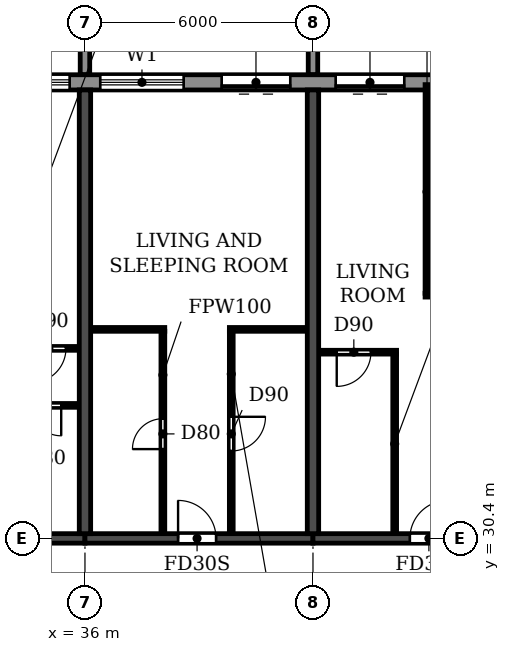
"""IFC4 building model, lengths in metres.
Left out: names, types, materials, properties, quantities, classifications, styles, units other than length and angle.
Written with IfcOpenShell. Run it as: python <this file> out.ifc"""

import sys

from ifc_helpers import new_model, si_unit, direction, frame, frame_2d, origin, place, context, subcontext, project, spatial, polyline, rectangle, outline, extrude, source, transform, mapped, element, fill, save


model = new_model("IFC4")
c1 = context("Model", 3, precision=1e-05, world=origin(), true_north=direction((0.0, 1.0)))
c2 = subcontext(c1, "Body", "Model", "MODEL_VIEW")
j1 = project(units=[si_unit("LENGTHUNIT", "METRE"), si_unit("PLANEANGLEUNIT", "RADIAN")], contexts=[c1])
p1 = place(None, origin())
s1 = spatial("IfcSite", under=j1, at=p1, CompositionType="ELEMENT")
p2 = place(p1, origin())
s2 = spatial("IfcBuilding", under=s1, at=p2, CompositionType="ELEMENT")
p3 = place(p2, frame((0.0, 0.0, 132.3)))
s3 = spatial("IfcBuildingStorey", under=s2, at=p3, CompositionType="ELEMENT", Elevation=132.3)
for number, where, z_axis, x_axis in (
    (1, (36.0, 30.525, 0.0), (0.0, 0.0, 1.0), (0.0, 1.0, 0.0)),
    (2, (42.0, 30.525, 0.0), (0.0, 0.0, 1.0), (0.0, 1.0, 0.0)),
):
    element("IfcWall", number, at=place(p3, frame(where, z_axis=z_axis, x_axis=x_axis)), inside=s3, PredefinedType="SHEAR", context=c2, shape_type="SweptSolid", body=[
        extrude(rectangle(XDim=11.675, YDim=0.3, at=frame_2d((5.837, 0.0))), origin(), (0.0, 0.0, 1.0), 3.07),
    ])
p4 = place(p3, frame((30.0, 30.4, 0.0), z_axis=(0.0, 0.0, 1.0), x_axis=(1.0, 0.0, 0.0)))
e3 = element("IfcWall", 3, at=p4, inside=s3, PredefinedType="SHEAR", context=c2, shape_type="SweptSolid", body=[
    extrude(rectangle(XDim=6.0, YDim=0.25, at=frame_2d((3.0, 0.0))), origin(), (0.0, 0.0, 1.0), 2.47),
])
p5 = place(p4, frame((2.55, 0.0, 0.0)))
e4 = element("IfcOpeningElement", 4, at=p5, cuts=e3, PredefinedType="OPENING", context=c2, shape_type="SweptSolid", body=[
    extrude(rectangle(XDim=1.0, YDim=2.1, at=frame_2d((0.5, 1.05))), frame((0.0, 0.135, 0.0), z_axis=(0.0, -1.0, 0.0), x_axis=(1.0, 0.0, 0.0)), (0.0, 0.0, 1.0), 0.27),
])
p6 = place(p3, frame((36.0, 30.4, 0.0), z_axis=(0.0, 0.0, 1.0), x_axis=(1.0, 0.0, 0.0)))
e5 = element("IfcWall", 5, at=p6, inside=s3, PredefinedType="SHEAR", context=c2, shape_type="SweptSolid", body=[
    extrude(rectangle(XDim=6.0, YDim=0.25, at=frame_2d((3.0, 0.0))), origin(), (0.0, 0.0, 1.0), 2.47),
])
p7 = place(p6, frame((2.45, 0.0, 0.0)))
e6 = element("IfcOpeningElement", 6, at=p7, cuts=e5, PredefinedType="OPENING", context=c2, shape_type="SweptSolid", body=[
    extrude(rectangle(XDim=1.0, YDim=2.1, at=frame_2d((0.5, 1.05))), frame((0.0, 0.135, 0.0), z_axis=(0.0, -1.0, 0.0), x_axis=(1.0, 0.0, 0.0)), (0.0, 0.0, 1.0), 0.27),
])
p8 = place(p3, frame((42.0, 30.4, 0.0), z_axis=(0.0, 0.0, 1.0), x_axis=(1.0, 0.0, 0.0)))
e7 = element("IfcWall", 7, at=p8, inside=s3, PredefinedType="SHEAR", context=c2, shape_type="SweptSolid", body=[
    extrude(rectangle(XDim=6.0, YDim=0.25, at=frame_2d((3.0, 0.0))), origin(), (0.0, 0.0, 1.0), 2.47),
])
p9 = place(p8, frame((2.55, 0.0, 0.0)))
e8 = element("IfcOpeningElement", 8, at=p9, cuts=e7, PredefinedType="OPENING", context=c2, shape_type="SweptSolid", body=[
    extrude(rectangle(XDim=1.0, YDim=2.1, at=frame_2d((0.5, 1.05))), frame((0.0, 0.135, 0.0), z_axis=(0.0, -1.0, 0.0), x_axis=(1.0, 0.0, 0.0)), (0.0, 0.0, 1.0), 0.27),
])
p10 = place(p3, frame((85.317, 42.4, 0.0), z_axis=(0.0, 0.0, 1.0), x_axis=(-1.0, 0.0, 0.0)))
e9 = element("IfcWall", 9, at=p10, inside=s3, PredefinedType="STANDARD", context=c2, shape_type="SweptSolid", body=[
    extrude(rectangle(XDim=68.634, YDim=0.4, at=frame_2d((34.317, 0.0))), origin(), (0.0, 0.0, 1.0), 3.07),
])
p11 = place(p10, frame((64.917, 0.0, 0.0)))
e10 = element("IfcOpeningElement", 10, at=p11, cuts=e9, PredefinedType="OPENING", context=c2, shape_type="SweptSolid", body=[
    extrude(rectangle(XDim=1.8, YDim=2.4, at=frame_2d((0.9, 1.2))), frame((0.0, 0.21, 0.0), z_axis=(0.0, -1.0, 0.0), x_axis=(1.0, 0.0, 0.0)), (0.0, 0.0, 1.0), 0.42),
])
p12 = place(p10, frame((61.717, 0.0, 0.9)))
e11 = element("IfcOpeningElement", 11, at=p12, cuts=e9, PredefinedType="OPENING", context=c2, shape_type="SweptSolid", body=[
    extrude(rectangle(XDim=2.2, YDim=1.5, at=frame_2d((1.1, 0.75))), frame((0.0, 0.21, 0.0), z_axis=(0.0, -1.0, 0.0), x_axis=(1.0, 0.0, 0.0)), (0.0, 0.0, 1.0), 0.42),
])
p13 = place(p10, frame((58.717, 0.0, 0.9)))
e12 = element("IfcOpeningElement", 12, at=p13, cuts=e9, PredefinedType="OPENING", context=c2, shape_type="SweptSolid", body=[
    extrude(rectangle(XDim=2.2, YDim=1.5, at=frame_2d((1.1, 0.75))), frame((0.0, 0.21, 0.0), z_axis=(0.0, -1.0, 0.0), x_axis=(1.0, 0.0, 0.0)), (0.0, 0.0, 1.0), 0.42),
])
p14 = place(p10, frame((55.717, 0.0, 0.9)))
e13 = element("IfcOpeningElement", 13, at=p14, cuts=e9, PredefinedType="OPENING", context=c2, shape_type="SweptSolid", body=[
    extrude(rectangle(XDim=2.2, YDim=1.5, at=frame_2d((1.1, 0.75))), frame((0.0, 0.21, 0.0), z_axis=(0.0, -1.0, 0.0), x_axis=(1.0, 0.0, 0.0)), (0.0, 0.0, 1.0), 0.42),
])
p15 = place(p10, frame((52.917, 0.0, 0.0)))
e14 = element("IfcOpeningElement", 14, at=p15, cuts=e9, PredefinedType="OPENING", context=c2, shape_type="SweptSolid", body=[
    extrude(rectangle(XDim=1.8, YDim=2.4, at=frame_2d((0.9, 1.2))), frame((0.0, 0.21, 0.0), z_axis=(0.0, -1.0, 0.0), x_axis=(1.0, 0.0, 0.0)), (0.0, 0.0, 1.0), 0.42),
])
p16 = place(p10, frame((49.717, 0.0, 0.9)))
e15 = element("IfcOpeningElement", 15, at=p16, cuts=e9, PredefinedType="OPENING", context=c2, shape_type="SweptSolid", body=[
    extrude(rectangle(XDim=2.2, YDim=1.5, at=frame_2d((1.1, 0.75))), frame((0.0, 0.21, 0.0), z_axis=(0.0, -1.0, 0.0), x_axis=(1.0, 0.0, 0.0)), (0.0, 0.0, 1.0), 0.42),
])
p17 = place(p10, frame((46.717, 0.0, 0.9)))
e16 = element("IfcOpeningElement", 16, at=p17, cuts=e9, PredefinedType="OPENING", context=c2, shape_type="SweptSolid", body=[
    extrude(rectangle(XDim=2.2, YDim=1.5, at=frame_2d((1.1, 0.75))), frame((0.0, 0.21, 0.0), z_axis=(0.0, -1.0, 0.0), x_axis=(1.0, 0.0, 0.0)), (0.0, 0.0, 1.0), 0.42),
])
p18 = place(p10, frame((43.917, 0.0, 0.0)))
e17 = element("IfcOpeningElement", 17, at=p18, cuts=e9, PredefinedType="OPENING", context=c2, shape_type="SweptSolid", body=[
    extrude(rectangle(XDim=1.8, YDim=2.4, at=frame_2d((0.9, 1.2))), frame((0.0, 0.21, 0.0), z_axis=(0.0, -1.0, 0.0), x_axis=(1.0, 0.0, 0.0)), (0.0, 0.0, 1.0), 0.42),
])
p19 = place(p10, frame((40.917, 0.0, 0.0)))
e18 = element("IfcOpeningElement", 18, at=p19, cuts=e9, PredefinedType="OPENING", context=c2, shape_type="SweptSolid", body=[
    extrude(rectangle(XDim=1.8, YDim=2.4, at=frame_2d((0.9, 1.2))), frame((0.0, 0.21, 0.0), z_axis=(0.0, -1.0, 0.0), x_axis=(1.0, 0.0, 0.0)), (0.0, 0.0, 1.0), 0.42),
])
p20 = place(p10, frame((37.717, 0.0, 0.9)))
e19 = element("IfcOpeningElement", 19, at=p20, cuts=e9, PredefinedType="OPENING", context=c2, shape_type="SweptSolid", body=[
    extrude(rectangle(XDim=2.2, YDim=1.5, at=frame_2d((1.1, 0.75))), frame((0.0, 0.21, 0.0), z_axis=(0.0, -1.0, 0.0), x_axis=(1.0, 0.0, 0.0)), (0.0, 0.0, 1.0), 0.42),
])
p21 = place(p10, frame((34.717, 0.0, 0.9)))
e20 = element("IfcOpeningElement", 20, at=p21, cuts=e9, PredefinedType="OPENING", context=c2, shape_type="SweptSolid", body=[
    extrude(rectangle(XDim=2.2, YDim=1.5, at=frame_2d((1.1, 0.75))), frame((0.0, 0.21, 0.0), z_axis=(0.0, -1.0, 0.0), x_axis=(1.0, 0.0, 0.0)), (0.0, 0.0, 1.0), 0.42),
])
p22 = place(p10, frame((31.717, 0.0, 0.9)))
e21 = element("IfcOpeningElement", 21, at=p22, cuts=e9, PredefinedType="OPENING", context=c2, shape_type="SweptSolid", body=[
    extrude(rectangle(XDim=2.2, YDim=1.5, at=frame_2d((1.1, 0.75))), frame((0.0, 0.21, 0.0), z_axis=(0.0, -1.0, 0.0), x_axis=(1.0, 0.0, 0.0)), (0.0, 0.0, 1.0), 0.42),
])
p23 = place(p10, frame((28.917, 0.0, 0.0)))
e22 = element("IfcOpeningElement", 22, at=p23, cuts=e9, PredefinedType="OPENING", context=c2, shape_type="SweptSolid", body=[
    extrude(rectangle(XDim=1.8, YDim=2.4, at=frame_2d((0.9, 1.2))), frame((0.0, 0.21, 0.0), z_axis=(0.0, -1.0, 0.0), x_axis=(1.0, 0.0, 0.0)), (0.0, 0.0, 1.0), 0.42),
])
p24 = place(p10, frame((25.717, 0.0, 0.9)))
e23 = element("IfcOpeningElement", 23, at=p24, cuts=e9, PredefinedType="OPENING", context=c2, shape_type="SweptSolid", body=[
    extrude(rectangle(XDim=2.2, YDim=1.5, at=frame_2d((1.1, 0.75))), frame((0.0, 0.21, 0.0), z_axis=(0.0, -1.0, 0.0), x_axis=(1.0, 0.0, 0.0)), (0.0, 0.0, 1.0), 0.42),
])
p25 = place(p10, frame((22.717, 0.0, 0.9)))
e24 = element("IfcOpeningElement", 24, at=p25, cuts=e9, PredefinedType="OPENING", context=c2, shape_type="SweptSolid", body=[
    extrude(rectangle(XDim=2.2, YDim=1.5, at=frame_2d((1.1, 0.75))), frame((0.0, 0.21, 0.0), z_axis=(0.0, -1.0, 0.0), x_axis=(1.0, 0.0, 0.0)), (0.0, 0.0, 1.0), 0.42),
])
p26 = place(p10, frame((19.717, 0.0, 0.9)))
e25 = element("IfcOpeningElement", 25, at=p26, cuts=e9, PredefinedType="OPENING", context=c2, shape_type="SweptSolid", body=[
    extrude(rectangle(XDim=2.2, YDim=1.5, at=frame_2d((1.1, 0.75))), frame((0.0, 0.21, 0.0), z_axis=(0.0, -1.0, 0.0), x_axis=(1.0, 0.0, 0.0)), (0.0, 0.0, 1.0), 0.42),
])
p27 = place(p10, frame((16.717, 0.0, 0.9)))
e26 = element("IfcOpeningElement", 26, at=p27, cuts=e9, PredefinedType="OPENING", context=c2, shape_type="SweptSolid", body=[
    extrude(rectangle(XDim=2.2, YDim=1.5, at=frame_2d((1.1, 0.75))), frame((0.0, 0.21, 0.0), z_axis=(0.0, -1.0, 0.0), x_axis=(1.0, 0.0, 0.0)), (0.0, 0.0, 1.0), 0.42),
])
p28 = place(p10, frame((13.917, 0.0, 0.0)))
e27 = element("IfcOpeningElement", 27, at=p28, cuts=e9, PredefinedType="OPENING", context=c2, shape_type="SweptSolid", body=[
    extrude(rectangle(XDim=1.8, YDim=2.4, at=frame_2d((0.9, 1.2))), frame((0.0, 0.21, 0.0), z_axis=(0.0, -1.0, 0.0), x_axis=(1.0, 0.0, 0.0)), (0.0, 0.0, 1.0), 0.42),
])
p29 = place(p10, frame((10.717, 0.0, 0.9)))
e28 = element("IfcOpeningElement", 28, at=p29, cuts=e9, PredefinedType="OPENING", context=c2, shape_type="SweptSolid", body=[
    extrude(rectangle(XDim=2.2, YDim=1.5, at=frame_2d((1.1, 0.75))), frame((0.0, 0.21, 0.0), z_axis=(0.0, -1.0, 0.0), x_axis=(1.0, 0.0, 0.0)), (0.0, 0.0, 1.0), 0.42),
])
p30 = place(p10, frame((7.917, 0.0, 0.0)))
e29 = element("IfcOpeningElement", 29, at=p30, cuts=e9, PredefinedType="OPENING", context=c2, shape_type="SweptSolid", body=[
    extrude(rectangle(XDim=1.8, YDim=2.4, at=frame_2d((0.9, 1.2))), frame((0.0, 0.21, 0.0), z_axis=(0.0, -1.0, 0.0), x_axis=(1.0, 0.0, 0.0)), (0.0, 0.0, 1.0), 0.42),
])
p31 = place(p10, frame((4.717, 0.0, 0.9)))
e30 = element("IfcOpeningElement", 30, at=p31, cuts=e9, PredefinedType="OPENING", context=c2, shape_type="SweptSolid", body=[
    extrude(rectangle(XDim=2.2, YDim=1.5, at=frame_2d((1.1, 0.75))), frame((0.0, 0.21, 0.0), z_axis=(0.0, -1.0, 0.0), x_axis=(1.0, 0.0, 0.0)), (0.0, 0.0, 1.0), 0.42),
])
p32 = place(p10, frame((1.917, 0.0, 0.0)))
e31 = element("IfcOpeningElement", 31, at=p32, cuts=e9, PredefinedType="OPENING", context=c2, shape_type="SweptSolid", body=[
    extrude(rectangle(XDim=1.8, YDim=2.4, at=frame_2d((0.9, 1.2))), frame((0.0, 0.21, 0.0), z_axis=(0.0, -1.0, 0.0), x_axis=(1.0, 0.0, 0.0)), (0.0, 0.0, 1.0), 0.42),
])
m1 = source(origin(), c2, "Body", "SweptSolid", [
    extrude(outline(polyline([(0.0, 0.0), (0.25, 0.0), (0.25, 3.1), (0.0, 3.1), (0.0, 0.0)])), origin(), (0.0, 0.0, 1.0), 3.1),
])
for number, where in (
    (32, (35.875, 42.6, 0.0)),
    (33, (41.875, 42.6, 0.0)),
):
    element("IfcWall", number, at=place(p3, frame(where)), inside=s3, PredefinedType="STANDARD", context=c2, shape_type="MappedRepresentation", body=[
        mapped(m1, transform((0.0, 0.0, 0.0))),
    ])
p33 = place(p3, frame((33.9, 33.9, 0.0), z_axis=(0.0, 0.0, 1.0), x_axis=(1.0, 0.0, 0.0)))
e34 = element("IfcWall", 34, at=p33, inside=s3, PredefinedType="PARTITIONING", context=c2, shape_type="SweptSolid", body=[
    extrude(rectangle(XDim=1.94, YDim=0.1, at=frame_2d((0.97, 0.0))), origin(), (0.0, 0.0, 1.0), 3.07),
])
p34 = place(p33, frame((0.675, 0.0, 0.0)))
e35 = element("IfcOpeningElement", 35, at=p34, cuts=e34, PredefinedType="OPENING", context=c2, shape_type="SweptSolid", body=[
    extrude(rectangle(XDim=0.8, YDim=2.1, at=frame_2d((0.4, 1.05))), frame((0.0, 0.06, 0.0), z_axis=(0.0, -1.0, 0.0), x_axis=(1.0, 0.0, 0.0)), (0.0, 0.0, 1.0), 0.12),
])
p35 = place(p3, frame((42.16, 35.3, 0.0), z_axis=(0.0, 0.0, 1.0), x_axis=(1.0, 0.0, 0.0)))
e36 = element("IfcWall", 36, at=p35, inside=s3, PredefinedType="PARTITIONING", context=c2, shape_type="SweptSolid", body=[
    extrude(rectangle(XDim=2.04, YDim=0.1, at=frame_2d((1.02, 0.0))), origin(), (0.0, 0.0, 1.0), 3.07),
])
p36 = place(p35, frame((0.465, 0.0, 0.0)))
e37 = element("IfcOpeningElement", 37, at=p36, cuts=e36, PredefinedType="OPENING", context=c2, shape_type="SweptSolid", body=[
    extrude(rectangle(XDim=0.9, YDim=2.1, at=frame_2d((0.45, 1.05))), frame((0.0, 0.06, 0.0), z_axis=(0.0, -1.0, 0.0), x_axis=(1.0, 0.0, 0.0)), (0.0, 0.0, 1.0), 0.12),
])
p37 = place(p3, frame((32.95, 35.4, 0.0), z_axis=(0.0, 0.0, 1.0), x_axis=(1.0, 0.0, 0.0)))
e38 = element("IfcWall", 38, at=p37, inside=s3, PredefinedType="PARTITIONING", context=c2, shape_type="SweptSolid", body=[
    extrude(rectangle(XDim=2.89, YDim=0.1, at=frame_2d((1.445, 0.0))), origin(), (0.0, 0.0, 1.0), 3.07),
])
p38 = place(p37, frame((1.65, 0.0, 0.0)))
e39 = element("IfcOpeningElement", 39, at=p38, cuts=e38, PredefinedType="OPENING", context=c2, shape_type="SweptSolid", body=[
    extrude(rectangle(XDim=0.9, YDim=2.1, at=frame_2d((0.45, 1.05))), frame((0.0, 0.06, 0.0), z_axis=(0.0, -1.0, 0.0), x_axis=(1.0, 0.0, 0.0)), (0.0, 0.0, 1.0), 0.12),
])
p39 = place(p3, frame((36.16, 35.9, 0.0), z_axis=(0.0, 0.0, 1.0), x_axis=(1.0, 0.0, 0.0)))
e40 = element("IfcWall", 40, at=p39, inside=s3, PredefinedType="PARTITIONING", context=c2, shape_type="SweptSolid", body=[
    extrude(rectangle(XDim=1.94, YDim=0.1, at=frame_2d((0.97, 0.0))), origin(), (0.0, 0.0, 1.0), 3.07),
])
p40 = place(p3, frame((39.8, 35.9, 0.0), z_axis=(0.0, 0.0, 1.0), x_axis=(1.0, 0.0, 0.0)))
e41 = element("IfcWall", 41, at=p40, inside=s3, PredefinedType="PARTITIONING", context=c2, shape_type="SweptSolid", body=[
    extrude(rectangle(XDim=2.04, YDim=0.1, at=frame_2d((1.02, 0.0))), origin(), (0.0, 0.0, 1.0), 3.07),
])
p41 = place(p3, frame((44.95, 36.8, 0.0), z_axis=(0.0, 0.0, 1.0), x_axis=(1.0, 0.0, 0.0)))
e42 = element("IfcWall", 42, at=p41, inside=s3, PredefinedType="PARTITIONING", context=c2, shape_type="SweptSolid", body=[
    extrude(rectangle(XDim=2.89, YDim=0.1, at=frame_2d((1.445, 0.0))), origin(), (0.0, 0.0, 1.0), 3.07),
])
p42 = place(p41, frame((1.65, 0.0, 0.0)))
e43 = element("IfcOpeningElement", 43, at=p42, cuts=e42, PredefinedType="OPENING", context=c2, shape_type="SweptSolid", body=[
    extrude(rectangle(XDim=0.9, YDim=2.1, at=frame_2d((0.45, 1.05))), frame((0.0, 0.06, 0.0), z_axis=(0.0, -1.0, 0.0), x_axis=(1.0, 0.0, 0.0)), (0.0, 0.0, 1.0), 0.12),
])
p43 = place(p3, frame((38.05, 30.535, 0.0), z_axis=(0.0, 0.0, 1.0), x_axis=(0.0, 1.0, 0.0)))
e44 = element("IfcWall", 44, at=p43, inside=s3, PredefinedType="PARTITIONING", context=c2, shape_type="SweptSolid", body=[
    extrude(rectangle(XDim=5.315, YDim=0.1, at=frame_2d((2.658, 0.0))), origin(), (0.0, 0.0, 1.0), 3.07),
])
p44 = place(p43, frame((2.215, 0.0, 0.0)))
e45 = element("IfcOpeningElement", 45, at=p44, cuts=e44, PredefinedType="OPENING", context=c2, shape_type="SweptSolid", body=[
    extrude(rectangle(XDim=0.8, YDim=2.1, at=frame_2d((0.4, 1.05))), frame((0.0, 0.06, 0.0), z_axis=(0.0, -1.0, 0.0), x_axis=(1.0, 0.0, 0.0)), (0.0, 0.0, 1.0), 0.12),
])
p45 = place(p3, frame((39.85, 30.535, 0.0), z_axis=(0.0, 0.0, 1.0), x_axis=(0.0, 1.0, 0.0)))
e46 = element("IfcWall", 46, at=p45, inside=s3, PredefinedType="PARTITIONING", context=c2, shape_type="SweptSolid", body=[
    extrude(rectangle(XDim=5.315, YDim=0.1, at=frame_2d((2.658, 0.0))), origin(), (0.0, 0.0, 1.0), 3.07),
])
p46 = place(p45, frame((2.165, 0.0, 0.0)))
e47 = element("IfcOpeningElement", 47, at=p46, cuts=e46, PredefinedType="OPENING", context=c2, shape_type="SweptSolid", body=[
    extrude(rectangle(XDim=0.9, YDim=2.1, at=frame_2d((0.45, 1.05))), frame((0.0, 0.06, 0.0), z_axis=(0.0, -1.0, 0.0), x_axis=(1.0, 0.0, 0.0)), (0.0, 0.0, 1.0), 0.12),
])
p47 = place(p3, frame((44.15, 30.535, 0.0), z_axis=(0.0, 0.0, 1.0), x_axis=(0.0, 1.0, 0.0)))
e48 = element("IfcWall", 48, at=p47, inside=s3, PredefinedType="PARTITIONING", context=c2, shape_type="SweptSolid", body=[
    extrude(rectangle(XDim=4.715, YDim=0.1, at=frame_2d((2.357, 0.0))), origin(), (0.0, 0.0, 1.0), 3.07),
])
p48 = place(p3, frame((45.0, 36.85, 0.0), z_axis=(0.0, 0.0, 1.0), x_axis=(0.0, 1.0, 0.0)))
e49 = element("IfcWall", 49, at=p48, inside=s3, PredefinedType="PARTITIONING", context=c2, shape_type="SweptSolid", body=[
    extrude(rectangle(XDim=5.49, YDim=0.1, at=frame_2d((2.745, 0.0))), origin(), (0.0, 0.0, 1.0), 3.07),
])
p49 = place(p16, origin())
e50 = element("IfcWindow", 50, at=p49, inside=s3, PartitioningType="DOUBLE_PANEL_HORIZONTAL", PredefinedType="WINDOW", context=c2, shape_type="SweptSolid", body=[
    extrude(rectangle(XDim=2.2, YDim=1.5, at=frame_2d((1.1, 0.75))), frame((0.0, 0.03, 0.0), z_axis=(0.0, -1.0, 0.0), x_axis=(1.0, 0.0, 0.0)), (0.0, 0.0, 1.0), 0.06),
])
fill(e15, e50)
p50 = place(p17, origin())
e51 = element("IfcWindow", 51, at=p50, inside=s3, PartitioningType="DOUBLE_PANEL_HORIZONTAL", PredefinedType="WINDOW", context=c2, shape_type="SweptSolid", body=[
    extrude(rectangle(XDim=2.2, YDim=1.5, at=frame_2d((1.1, 0.75))), frame((0.0, 0.03, 0.0), z_axis=(0.0, -1.0, 0.0), x_axis=(1.0, 0.0, 0.0)), (0.0, 0.0, 1.0), 0.06),
])
fill(e16, e51)
p51 = place(p18, origin())
e52 = element("IfcDoor", 52, at=p51, inside=s3, OperationType="DOUBLE_DOOR_SLIDING", PredefinedType="DOOR", context=c2, shape_type="SweptSolid", body=[
    extrude(rectangle(XDim=1.8, YDim=2.4, at=frame_2d((0.9, 1.2))), frame((0.0, 0.025, 0.0), z_axis=(0.0, -1.0, 0.0), x_axis=(1.0, 0.0, 0.0)), (0.0, 0.0, 1.0), 0.05),
])
fill(e17, e52)
p52 = place(p19, origin())
e53 = element("IfcDoor", 53, at=p52, inside=s3, OperationType="DOUBLE_DOOR_SLIDING", PredefinedType="DOOR", context=c2, shape_type="SweptSolid", body=[
    extrude(rectangle(XDim=1.8, YDim=2.4, at=frame_2d((0.9, 1.2))), frame((0.0, 0.025, 0.0), z_axis=(0.0, -1.0, 0.0), x_axis=(1.0, 0.0, 0.0)), (0.0, 0.0, 1.0), 0.05),
])
fill(e18, e53)
p53 = place(p34, frame((0.8, 0.0, 0.0), z_axis=(0.0, 0.0, 1.0), x_axis=(-1.0, 0.0, 0.0)))
e54 = element("IfcDoor", 54, at=p53, inside=s3, OperationType="SINGLE_SWING_LEFT", PredefinedType="DOOR", context=c2, shape_type="SweptSolid", body=[
    extrude(rectangle(XDim=0.8, YDim=2.1, at=frame_2d((0.4, 1.05))), frame((0.0, 0.025, 0.0), z_axis=(0.0, -1.0, 0.0), x_axis=(1.0, 0.0, 0.0)), (0.0, 0.0, 1.0), 0.05),
])
fill(e35, e54)
p54 = place(p38, frame((0.9, 0.0, 0.0), z_axis=(0.0, 0.0, 1.0), x_axis=(-1.0, 0.0, 0.0)))
e55 = element("IfcDoor", 55, at=p54, inside=s3, OperationType="SINGLE_SWING_RIGHT", PredefinedType="DOOR", context=c2, shape_type="SweptSolid", body=[
    extrude(rectangle(XDim=0.9, YDim=2.1, at=frame_2d((0.45, 1.05))), frame((0.0, 0.025, 0.0), z_axis=(0.0, -1.0, 0.0), x_axis=(1.0, 0.0, 0.0)), (0.0, 0.0, 1.0), 0.05),
])
fill(e39, e55)
p55 = place(p44, origin())
e56 = element("IfcDoor", 56, at=p55, inside=s3, OperationType="SINGLE_SWING_LEFT", PredefinedType="DOOR", context=c2, shape_type="SweptSolid", body=[
    extrude(rectangle(XDim=0.8, YDim=2.1, at=frame_2d((0.4, 1.05))), frame((0.0, 0.025, 0.0), z_axis=(0.0, -1.0, 0.0), x_axis=(1.0, 0.0, 0.0)), (0.0, 0.0, 1.0), 0.05),
])
fill(e45, e56)
p56 = place(p7, origin())
e57 = element("IfcDoor", 57, at=p56, inside=s3, OperationType="SINGLE_SWING_LEFT", PredefinedType="DOOR", context=c2, shape_type="SweptSolid", body=[
    extrude(rectangle(XDim=1.0, YDim=2.1, at=frame_2d((0.5, 1.05))), frame((0.0, 0.025, 0.0), z_axis=(0.0, -1.0, 0.0), x_axis=(1.0, 0.0, 0.0)), (0.0, 0.0, 1.0), 0.05),
])
fill(e6, e57)
p57 = place(p46, frame((0.9, 0.0, 0.0), z_axis=(0.0, 0.0, 1.0), x_axis=(-1.0, 0.0, 0.0)))
e58 = element("IfcDoor", 58, at=p57, inside=s3, OperationType="SINGLE_SWING_LEFT", PredefinedType="DOOR", context=c2, shape_type="SweptSolid", body=[
    extrude(rectangle(XDim=0.9, YDim=2.1, at=frame_2d((0.45, 1.05))), frame((0.0, 0.025, 0.0), z_axis=(0.0, -1.0, 0.0), x_axis=(1.0, 0.0, 0.0)), (0.0, 0.0, 1.0), 0.05),
])
fill(e47, e58)
p58 = place(p36, frame((0.9, 0.0, 0.0), z_axis=(0.0, 0.0, 1.0), x_axis=(-1.0, 0.0, 0.0)))
e59 = element("IfcDoor", 59, at=p58, inside=s3, OperationType="SINGLE_SWING_RIGHT", PredefinedType="DOOR", context=c2, shape_type="SweptSolid", body=[
    extrude(rectangle(XDim=0.9, YDim=2.1, at=frame_2d((0.45, 1.05))), frame((0.0, 0.025, 0.0), z_axis=(0.0, -1.0, 0.0), x_axis=(1.0, 0.0, 0.0)), (0.0, 0.0, 1.0), 0.05),
])
fill(e37, e59)
p59 = place(p9, origin())
e60 = element("IfcDoor", 60, at=p59, inside=s3, OperationType="SINGLE_SWING_RIGHT", PredefinedType="DOOR", context=c2, shape_type="SweptSolid", body=[
    extrude(rectangle(XDim=1.0, YDim=2.1, at=frame_2d((0.5, 1.05))), frame((0.0, 0.025, 0.0), z_axis=(0.0, -1.0, 0.0), x_axis=(1.0, 0.0, 0.0)), (0.0, 0.0, 1.0), 0.05),
])
fill(e8, e60)
save(model, sys.argv[1])
